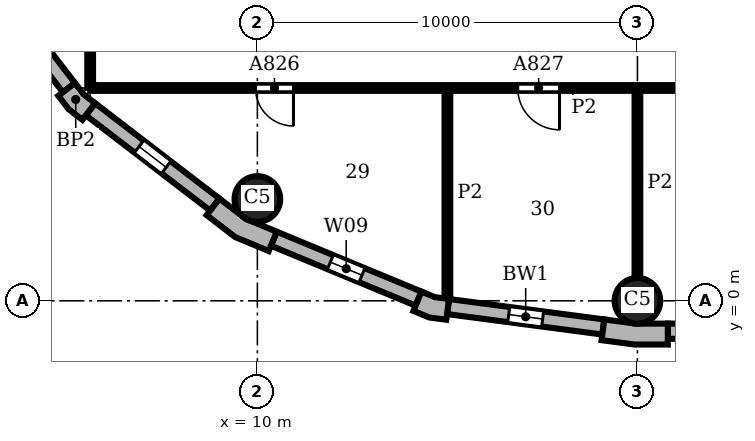
"""IFC4 building model, lengths in metres.
Left out: names, types, materials, properties, quantities, classifications, styles, units other than length and angle.
Written with IfcOpenShell. Run it as: python <this file> out.ifc"""

import sys

from ifc_helpers import new_model, si_unit, direction, frame, frame_2d, origin, origin_2d, place, context, subcontext, project, spatial, polyline, rectangle, circle, outline, extrude, element, fill, save


model = new_model("IFC4")
c1 = context("Model", 3, precision=1e-05, world=origin(), true_north=direction((0.0, 1.0)))
c2 = subcontext(c1, "Body", "Model", "MODEL_VIEW")
j1 = project(units=[si_unit("LENGTHUNIT", "METRE"), si_unit("PLANEANGLEUNIT", "RADIAN")], contexts=[c1])
p1 = place(None, origin())
s1 = spatial("IfcSite", under=j1, at=p1, CompositionType="ELEMENT")
p2 = place(p1, origin())
s2 = spatial("IfcBuilding", under=s1, at=p2, CompositionType="ELEMENT")
p3 = place(p2, frame((0.0, 0.0, 93.9)))
s3 = spatial("IfcBuildingStorey", under=s2, at=p3, CompositionType="ELEMENT", Elevation=93.9)
for number, where, z_axis, x_axis in (
    (1, (20.0, 0.0, 0.0), (0.0, 0.0, 1.0), (1.0, 0.0, 0.0)),
    (2, (10.0, 2.679, 0.0), (0.0, 0.0, 1.0), (1.0, 0.0, 0.0)),
):
    element("IfcColumn", number, at=place(p3, frame(where, z_axis=z_axis, x_axis=x_axis)), inside=s3, PredefinedType="COLUMN", context=c2, shape_type="SweptSolid", body=[
        extrude(circle(Radius=0.6, at=origin_2d()), origin(), (0.0, 0.0, 1.0), 3.9),
    ])
p4 = place(p3, origin())
e3 = element("IfcWall", 3, at=p4, inside=s3, PredefinedType="SOLIDWALL", context=c2, shape_type="SweptSolid", body=[
    extrude(outline(polyline([(19.076, -0.887), (19.057, -1.036), (19.925, -1.15), (20.8, -1.15), (20.8, -1.0), (20.8, -0.6), (19.961, -0.6), (19.128, -0.49), (19.076, -0.887)])), origin(), (0.0, 0.0, 1.0), 3.9),
])
e4 = element("IfcWall", 4, at=p4, inside=s3, PredefinedType="SOLIDWALL", context=c2, shape_type="SweptSolid", body=[
    extrude(outline(polyline([(4.882, 5.487), (4.763, 5.396), (5.038, 5.038), (5.396, 4.763), (5.487, 4.882), (5.731, 5.199), (5.43, 5.43), (5.199, 5.731), (4.882, 5.487)])), origin(), (0.0, 0.0, 1.0), 3.9),
])
e5 = element("IfcWall", 5, at=p4, inside=s3, PredefinedType="SOLIDWALL", context=c2, shape_type="SweptSolid", body=[
    extrude(outline(polyline([(8.757, 2.373), (8.665, 2.254), (9.42, 1.675), (10.299, 1.311), (10.356, 1.449), (10.51, 1.819), (9.698, 2.155), (9.0, 2.69), (8.757, 2.373)])), origin(), (0.0, 0.0, 1.0), 3.9),
])
e6 = element("IfcWall", 6, at=p4, inside=s3, PredefinedType="SOLIDWALL", context=c2, shape_type="SweptSolid", body=[
    extrude(outline(polyline([(14.164, -0.128), (14.106, -0.266), (14.523, -0.439), (14.971, -0.498), (14.99, -0.349), (15.043, 0.047), (14.667, 0.097), (14.317, 0.242), (14.164, -0.128)])), origin(), (0.0, 0.0, 1.0), 3.9),
])
p5 = place(p3, frame((20.8, -0.8, 0.0), z_axis=(0.0, 0.0, 1.0), x_axis=(1.0, 0.0, 0.0)))
e7 = element("IfcWall", 7, at=p5, inside=s3, PredefinedType="SOLIDWALL", context=c2, shape_type="SweptSolid", body=[
    extrude(rectangle(XDim=48.4, YDim=0.4, at=frame_2d((24.2, 0.0))), origin(), (0.0, 0.0, 1.0), 3.9),
])
p6 = place(p5, frame((3.75, 0.0, 0.9)))
e8 = element("IfcOpeningElement", 8, at=p6, cuts=e7, PredefinedType="OPENING", context=c2, shape_type="SweptSolid", body=[
    extrude(rectangle(XDim=0.9, YDim=2.35, at=frame_2d((0.45, 1.175))), frame((0.0, 0.21, 0.0), z_axis=(0.0, -1.0, 0.0), x_axis=(1.0, 0.0, 0.0)), (0.0, 0.0, 1.0), 0.42),
])
p7 = place(p5, frame((13.75, 0.0, 0.9)))
e9 = element("IfcOpeningElement", 9, at=p7, cuts=e7, PredefinedType="OPENING", context=c2, shape_type="SweptSolid", body=[
    extrude(rectangle(XDim=0.9, YDim=2.35, at=frame_2d((0.45, 1.175))), frame((0.0, 0.21, 0.0), z_axis=(0.0, -1.0, 0.0), x_axis=(1.0, 0.0, 0.0)), (0.0, 0.0, 1.0), 0.42),
])
p8 = place(p5, frame((23.75, 0.0, 0.9)))
e10 = element("IfcOpeningElement", 10, at=p8, cuts=e7, PredefinedType="OPENING", context=c2, shape_type="SweptSolid", body=[
    extrude(rectangle(XDim=0.9, YDim=2.35, at=frame_2d((0.45, 1.175))), frame((0.0, 0.21, 0.0), z_axis=(0.0, -1.0, 0.0), x_axis=(1.0, 0.0, 0.0)), (0.0, 0.0, 1.0), 0.42),
])
p9 = place(p5, frame((33.75, 0.0, 0.9)))
e11 = element("IfcOpeningElement", 11, at=p9, cuts=e7, PredefinedType="OPENING", context=c2, shape_type="SweptSolid", body=[
    extrude(rectangle(XDim=0.9, YDim=2.35, at=frame_2d((0.45, 1.175))), frame((0.0, 0.21, 0.0), z_axis=(0.0, -1.0, 0.0), x_axis=(1.0, 0.0, 0.0)), (0.0, 0.0, 1.0), 0.42),
])
p10 = place(p5, frame((43.75, 0.0, 0.9)))
e12 = element("IfcOpeningElement", 12, at=p10, cuts=e7, PredefinedType="OPENING", context=c2, shape_type="SweptSolid", body=[
    extrude(rectangle(XDim=0.9, YDim=2.35, at=frame_2d((0.45, 1.175))), frame((0.0, 0.21, 0.0), z_axis=(0.0, -1.0, 0.0), x_axis=(1.0, 0.0, 0.0)), (0.0, 0.0, 1.0), 0.42),
])
p11 = place(p3, frame((2.532, 8.878, 0.0), z_axis=(0.0, 0.0, 1.0), x_axis=(0.608759824817, -0.793354571229, 0.0)))
e13 = element("IfcWall", 13, at=p11, inside=s3, PredefinedType="SOLIDWALL", context=c2, shape_type="SweptSolid", body=[
    extrude(rectangle(XDim=4.121, YDim=0.4, at=frame_2d((2.061, 0.0))), origin(), (0.0, 0.0, 1.0), 3.9),
])
p12 = place(p11, frame((1.611, 0.0, 0.9)))
e14 = element("IfcOpeningElement", 14, at=p12, cuts=e13, PredefinedType="OPENING", context=c2, shape_type="SweptSolid", body=[
    extrude(rectangle(XDim=0.9, YDim=2.35, at=frame_2d((0.45, 1.175))), frame((0.0, 0.21, 0.0), z_axis=(0.0, -1.0, 0.0), x_axis=(1.0, 0.0, 0.0)), (0.0, 0.0, 1.0), 0.42),
])
p13 = place(p3, frame((5.609, 5.041, 0.0), z_axis=(0.0, 0.0, 1.0), x_axis=(0.793354571229, -0.608759824817, 0.0)))
e15 = element("IfcWall", 15, at=p13, inside=s3, PredefinedType="SOLIDWALL", context=c2, shape_type="SweptSolid", body=[
    extrude(rectangle(XDim=4.121, YDim=0.4, at=frame_2d((2.061, 0.0))), origin(), (0.0, 0.0, 1.0), 3.9),
])
p14 = place(p13, frame((1.611, 0.0, 0.9)))
e16 = element("IfcOpeningElement", 16, at=p14, cuts=e15, PredefinedType="OPENING", context=c2, shape_type="SweptSolid", body=[
    extrude(rectangle(XDim=0.9, YDim=2.35, at=frame_2d((0.45, 1.175))), frame((0.0, 0.21, 0.0), z_axis=(0.0, -1.0, 0.0), x_axis=(1.0, 0.0, 0.0)), (0.0, 0.0, 1.0), 0.42),
])
p15 = place(p3, frame((10.433, 1.634, 0.0), z_axis=(0.0, 0.0, 1.0), x_axis=(0.923863744394, -0.382721546029, 0.0)))
e17 = element("IfcWall", 17, at=p15, inside=s3, PredefinedType="SOLIDWALL", context=c2, shape_type="SweptSolid", body=[
    extrude(rectangle(XDim=4.121, YDim=0.4, at=frame_2d((2.061, 0.0))), origin(), (0.0, 0.0, 1.0), 3.9),
])
p16 = place(p15, frame((1.611, 0.0, 0.9)))
e18 = element("IfcOpeningElement", 18, at=p16, cuts=e17, PredefinedType="OPENING", context=c2, shape_type="SweptSolid", body=[
    extrude(rectangle(XDim=0.9, YDim=2.35, at=frame_2d((0.45, 1.175))), frame((0.0, 0.21, 0.0), z_axis=(0.0, -1.0, 0.0), x_axis=(1.0, 0.0, 0.0)), (0.0, 0.0, 1.0), 0.42),
])
p17 = place(p3, frame((15.017, -0.151, 0.0), z_axis=(0.0, 0.0, 1.0), x_axis=(0.991446429508, -0.130514280502, 0.0)))
e19 = element("IfcWall", 19, at=p17, inside=s3, PredefinedType="SOLIDWALL", context=c2, shape_type="SweptSolid", body=[
    extrude(rectangle(XDim=4.121, YDim=0.4, at=frame_2d((2.061, 0.0))), origin(), (0.0, 0.0, 1.0), 3.9),
])
p18 = place(p17, frame((1.611, 0.0, 0.9)))
e20 = element("IfcOpeningElement", 20, at=p18, cuts=e19, PredefinedType="OPENING", context=c2, shape_type="SweptSolid", body=[
    extrude(rectangle(XDim=0.9, YDim=2.35, at=frame_2d((0.45, 1.175))), frame((0.0, 0.21, 0.0), z_axis=(0.0, -1.0, 0.0), x_axis=(1.0, 0.0, 0.0)), (0.0, 0.0, 1.0), 0.42),
])
p19 = place(p3, frame((5.6, 5.6, 0.0), z_axis=(0.0, 0.0, 1.0), x_axis=(0.0, 1.0, 0.0)))
e21 = element("IfcWall", 21, at=p19, inside=s3, PredefinedType="PARTITIONING", context=c2, shape_type="SweptSolid", body=[
    extrude(rectangle(XDim=54.4, YDim=0.15, at=frame_2d((27.2, 0.0))), origin(), (0.0, 0.0, 1.0), 3.58),
])
p20 = place(p19, frame((5.5, 0.0, 0.0)))
e22 = element("IfcOpeningElement", 22, at=p20, cuts=e21, PredefinedType="OPENING", context=c2, shape_type="SweptSolid", body=[
    extrude(rectangle(XDim=1.0, YDim=2.1, at=frame_2d((0.5, 1.05))), frame((0.0, 0.085, 0.0), z_axis=(0.0, -1.0, 0.0), x_axis=(1.0, 0.0, 0.0)), (0.0, 0.0, 1.0), 0.17),
])
p21 = place(p19, frame((11.75, 0.0, 0.0)))
e23 = element("IfcOpeningElement", 23, at=p21, cuts=e21, PredefinedType="OPENING", context=c2, shape_type="SweptSolid", body=[
    extrude(rectangle(XDim=1.0, YDim=2.1, at=frame_2d((0.5, 1.05))), frame((0.0, 0.085, 0.0), z_axis=(0.0, -1.0, 0.0), x_axis=(1.0, 0.0, 0.0)), (0.0, 0.0, 1.0), 0.17),
])
p22 = place(p19, frame((18.25, 0.0, 0.0)))
e24 = element("IfcOpeningElement", 24, at=p22, cuts=e21, PredefinedType="OPENING", context=c2, shape_type="SweptSolid", body=[
    extrude(rectangle(XDim=1.0, YDim=2.1, at=frame_2d((0.5, 1.05))), frame((0.0, 0.085, 0.0), z_axis=(0.0, -1.0, 0.0), x_axis=(1.0, 0.0, 0.0)), (0.0, 0.0, 1.0), 0.17),
])
p23 = place(p19, frame((29.3, 0.0, 0.0)))
e25 = element("IfcOpeningElement", 25, at=p23, cuts=e21, PredefinedType="OPENING", context=c2, shape_type="SweptSolid", body=[
    extrude(rectangle(XDim=1.0, YDim=2.1, at=frame_2d((0.5, 1.05))), frame((0.0, 0.085, 0.0), z_axis=(0.0, -1.0, 0.0), x_axis=(1.0, 0.0, 0.0)), (0.0, 0.0, 1.0), 0.17),
])
p24 = place(p19, frame((39.75, 0.0, 0.0)))
e26 = element("IfcOpeningElement", 26, at=p24, cuts=e21, PredefinedType="OPENING", context=c2, shape_type="SweptSolid", body=[
    extrude(rectangle(XDim=1.0, YDim=2.1, at=frame_2d((0.5, 1.05))), frame((0.0, 0.085, 0.0), z_axis=(0.0, -1.0, 0.0), x_axis=(1.0, 0.0, 0.0)), (0.0, 0.0, 1.0), 0.17),
])
p25 = place(p19, frame((50.0, 0.0, 0.0)))
e27 = element("IfcOpeningElement", 27, at=p25, cuts=e21, PredefinedType="OPENING", context=c2, shape_type="SweptSolid", body=[
    extrude(rectangle(XDim=1.0, YDim=2.1, at=frame_2d((0.5, 1.05))), frame((0.0, 0.085, 0.0), z_axis=(0.0, -1.0, 0.0), x_axis=(1.0, 0.0, 0.0)), (0.0, 0.0, 1.0), 0.17),
])
p26 = place(p3, frame((15.0, 0.063, 0.0), z_axis=(0.0, 0.0, 1.0), x_axis=(0.0, 1.0, 0.0)))
e28 = element("IfcWall", 28, at=p26, inside=s3, PredefinedType="PARTITIONING", context=c2, shape_type="SweptSolid", body=[
    extrude(rectangle(XDim=5.537, YDim=0.15, at=frame_2d((2.769, 0.0))), origin(), (0.0, 0.0, 1.0), 3.58),
])
p27 = place(p3, frame((20.0, 0.6, 0.0), z_axis=(0.0, 0.0, 1.0), x_axis=(0.0, 1.0, 0.0)))
e29 = element("IfcWall", 29, at=p27, inside=s3, PredefinedType="PARTITIONING", context=c2, shape_type="SweptSolid", body=[
    extrude(rectangle(XDim=5.0, YDim=0.15, at=frame_2d((2.5, 0.0))), origin(), (0.0, 0.0, 1.0), 3.58),
])
p28 = place(p3, frame((5.6, 5.6, 0.0), z_axis=(0.0, 0.0, 1.0), x_axis=(1.0, 0.0, 0.0)))
e30 = element("IfcWall", 30, at=p28, inside=s3, PredefinedType="PARTITIONING", context=c2, shape_type="SweptSolid", body=[
    extrude(rectangle(XDim=25.4, YDim=0.15, at=frame_2d((12.7, 0.0))), origin(), (0.0, 0.0, 1.0), 3.58),
])
p29 = place(p28, frame((4.35, 0.0, 0.0)))
e31 = element("IfcOpeningElement", 31, at=p29, cuts=e30, PredefinedType="OPENING", context=c2, shape_type="SweptSolid", body=[
    extrude(rectangle(XDim=1.0, YDim=2.1, at=frame_2d((0.5, 1.05))), frame((0.0, 0.085, 0.0), z_axis=(0.0, -1.0, 0.0), x_axis=(1.0, 0.0, 0.0)), (0.0, 0.0, 1.0), 0.17),
])
p30 = place(p28, frame((11.25, 0.0, 0.0)))
e32 = element("IfcOpeningElement", 32, at=p30, cuts=e30, PredefinedType="OPENING", context=c2, shape_type="SweptSolid", body=[
    extrude(rectangle(XDim=1.1, YDim=2.1, at=frame_2d((0.55, 1.05))), frame((0.0, 0.085, 0.0), z_axis=(0.0, -1.0, 0.0), x_axis=(1.0, 0.0, 0.0)), (0.0, 0.0, 1.0), 0.17),
])
p31 = place(p28, frame((19.75, 0.0, 0.0)))
e33 = element("IfcOpeningElement", 33, at=p31, cuts=e30, PredefinedType="OPENING", context=c2, shape_type="SweptSolid", body=[
    extrude(rectangle(XDim=1.0, YDim=2.1, at=frame_2d((0.5, 1.05))), frame((0.0, 0.085, 0.0), z_axis=(0.0, -1.0, 0.0), x_axis=(1.0, 0.0, 0.0)), (0.0, 0.0, 1.0), 0.17),
])
p32 = place(p14, origin())
e34 = element("IfcWindow", 34, at=p32, inside=s3, PartitioningType="SINGLE_PANEL", PredefinedType="WINDOW", context=c2, shape_type="SweptSolid", body=[
    extrude(rectangle(XDim=0.9, YDim=2.35, at=frame_2d((0.45, 1.175))), frame((0.0, 0.16, 0.0), z_axis=(0.0, -1.0, 0.0), x_axis=(1.0, 0.0, 0.0)), (0.0, 0.0, 1.0), 0.06),
])
fill(e16, e34)
p33 = place(p16, origin())
e35 = element("IfcWindow", 35, at=p33, inside=s3, PartitioningType="SINGLE_PANEL", PredefinedType="WINDOW", context=c2, shape_type="SweptSolid", body=[
    extrude(rectangle(XDim=0.9, YDim=2.35, at=frame_2d((0.45, 1.175))), frame((0.0, 0.16, 0.0), z_axis=(0.0, -1.0, 0.0), x_axis=(1.0, 0.0, 0.0)), (0.0, 0.0, 1.0), 0.06),
])
fill(e18, e35)
p34 = place(p18, origin())
e36 = element("IfcWindow", 36, at=p34, inside=s3, PartitioningType="SINGLE_PANEL", PredefinedType="WINDOW", context=c2, shape_type="SweptSolid", body=[
    extrude(rectangle(XDim=0.9, YDim=2.35, at=frame_2d((0.45, 1.175))), frame((0.0, 0.16, 0.0), z_axis=(0.0, -1.0, 0.0), x_axis=(1.0, 0.0, 0.0)), (0.0, 0.0, 1.0), 0.06),
])
fill(e20, e36)
p35 = place(p29, frame((1.0, 0.0, 0.0), z_axis=(0.0, 0.0, 1.0), x_axis=(-1.0, 0.0, 0.0)))
e37 = element("IfcDoor", 37, at=p35, inside=s3, OperationType="SINGLE_SWING_LEFT", PredefinedType="DOOR", context=c2, shape_type="SweptSolid", body=[
    extrude(rectangle(XDim=1.0, YDim=2.1, at=frame_2d((0.5, 1.05))), frame((0.0, 0.025, 0.0), z_axis=(0.0, -1.0, 0.0), x_axis=(1.0, 0.0, 0.0)), (0.0, 0.0, 1.0), 0.05),
])
fill(e31, e37)
p36 = place(p30, frame((1.1, 0.0, 0.0), z_axis=(0.0, 0.0, 1.0), x_axis=(-1.0, 0.0, 0.0)))
e38 = element("IfcDoor", 38, at=p36, inside=s3, OperationType="SINGLE_SWING_LEFT", PredefinedType="DOOR", context=c2, shape_type="SweptSolid", body=[
    extrude(rectangle(XDim=1.1, YDim=2.1, at=frame_2d((0.55, 1.05))), frame((0.0, 0.025, 0.0), z_axis=(0.0, -1.0, 0.0), x_axis=(1.0, 0.0, 0.0)), (0.0, 0.0, 1.0), 0.05),
])
fill(e32, e38)
save(model, sys.argv[1])
